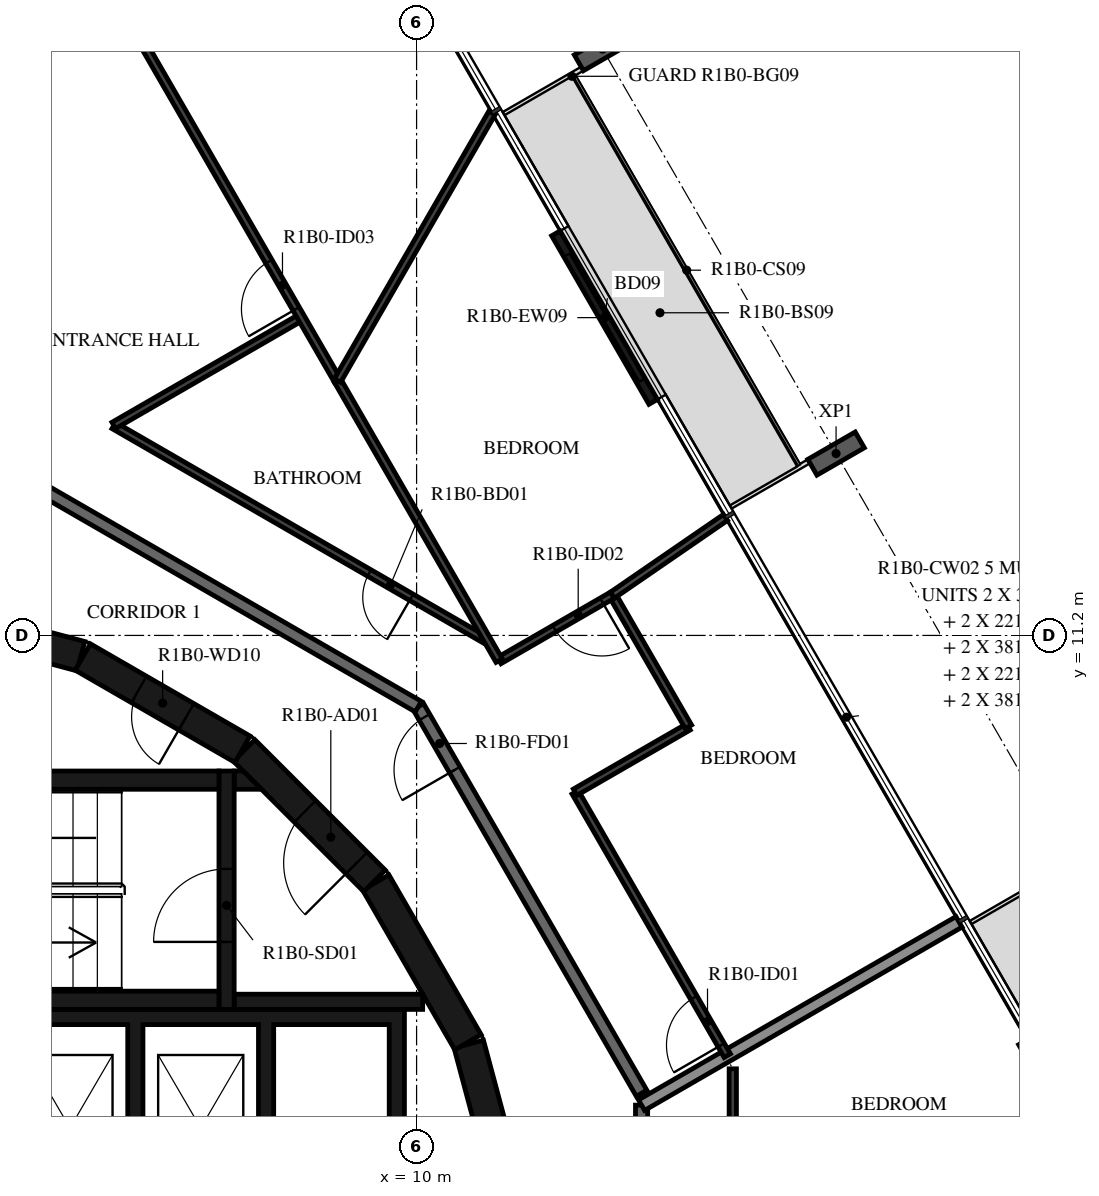
"""IFC4 building model, lengths in metres.
Left out: names, types, materials, properties, quantities, classifications, styles, units other than length and angle.
Written with IfcOpenShell. Run it as: python <this file> out.ifc"""

import sys

from ifc_helpers import new_model, si_unit, direction, frame, frame_2d, origin, origin_2d, place, context, subcontext, project, spatial, polyline, rectangle, i_section, outline, extrude, element, fill, save


model = new_model("IFC4")
c1 = context("Model", 3, precision=1e-05, world=origin(), true_north=direction((0.0, 1.0)))
c2 = subcontext(c1, "Body", "Model", "MODEL_VIEW")
j1 = project(units=[si_unit("LENGTHUNIT", "METRE"), si_unit("PLANEANGLEUNIT", "RADIAN")], contexts=[c1])
p1 = place(None, origin())
s1 = spatial("IfcSite", under=j1, at=p1, CompositionType="ELEMENT")
p2 = place(p1, origin())
s2 = spatial("IfcBuilding", under=s1, at=p2, CompositionType="ELEMENT")
p3 = place(p2, frame((0.0, 0.0, 52.4)))
s3 = spatial("IfcBuildingStorey", under=s2, at=p3, CompositionType="ELEMENT", Elevation=52.4)
for number, where, z_axis, x_axis in (
    (1, (16.899, 14.19, -0.38), (0.0, 0.0, 1.0), (0.5, -0.866, 0.0)),
    (2, (13.059, 20.842, -0.38), (0.0, 0.0, 1.0), (0.5, -0.866, 0.0)),
):
    element("IfcColumn", number, at=place(p3, frame(where, z_axis=z_axis, x_axis=x_axis)), inside=s3, PredefinedType="COLUMN", context=c2, shape_type="SweptSolid", body=[
        extrude(i_section(OverallWidth=0.3, OverallDepth=0.9, WebThickness=0.019, FlangeThickness=0.035, FilletRadius=0.03, at=origin_2d()), origin(), (0.0, 0.0, 1.0), 3.5),
    ])
p4 = place(p3, frame((21.571, 1.738, 0.0), z_axis=(0.0, 0.0, 1.0), x_axis=(-0.500028443584, 0.866008981251, 0.0)))
e3 = element("IfcWall", 3, at=p4, inside=s3, PredefinedType="STANDARD", context=c2, shape_type="SweptSolid", body=[
    extrude(rectangle(XDim=3.2, YDim=0.16, at=frame_2d((1.6, 0.0))), origin(), (0.0, 0.0, 1.0), 3.12),
])
p5 = place(p4, frame((0.4, 0.0, 0.0)))
e4 = element("IfcOpeningElement", 4, at=p5, cuts=e3, PredefinedType="OPENING", context=c2, shape_type="SweptSolid", body=[
    extrude(rectangle(XDim=2.4, YDim=2.4, at=frame_2d((1.2, 1.2))), frame((0.0, 0.09, 0.0), z_axis=(0.0, -1.0, 0.0), x_axis=(1.0, 0.0, 0.0)), (0.0, 0.0, 1.0), 0.18),
])
p6 = place(p3, frame((13.891, 15.041, 0.0), z_axis=(0.0, 0.0, 1.0), x_axis=(-0.499971222258, 0.866042017984, 0.0)))
e5 = element("IfcWall", 5, at=p6, inside=s3, PredefinedType="STANDARD", context=c2, shape_type="SweptSolid", body=[
    extrude(rectangle(XDim=3.2, YDim=0.16, at=frame_2d((1.6, 0.0))), origin(), (0.0, 0.0, 1.0), 3.12),
])
p7 = place(p6, frame((0.4, 0.0, 0.0)))
e6 = element("IfcOpeningElement", 6, at=p7, cuts=e5, PredefinedType="OPENING", context=c2, shape_type="SweptSolid", body=[
    extrude(rectangle(XDim=2.4, YDim=2.4, at=frame_2d((1.2, 1.2))), frame((0.0, 0.09, 0.0), z_axis=(0.0, -1.0, 0.0), x_axis=(1.0, 0.0, 0.0)), (0.0, 0.0, 1.0), 0.18),
])
for number, where, z_axis, x_axis in (
    (7, (11.643, 1.55, 0.0), (0.0, 0.0, 1.0), (-0.259, 0.966, 0.0)),
    (8, (10.845, 4.51, 0.0), (0.0, 0.0, 1.0), (-0.5, 0.866, 0.0)),
):
    element("IfcWall", number, at=place(p3, frame(where, z_axis=z_axis, x_axis=x_axis)), inside=s3, PredefinedType="SHEAR", context=c2, shape_type="SweptSolid", body=[
        extrude(rectangle(XDim=3.033, YDim=0.5, at=frame_2d((1.516, 0.0))), origin(), (0.0, 0.0, 1.0), 3.12),
    ])
p8 = place(p3, frame((9.308, 7.164, 0.0), z_axis=(0.0, 0.0, 1.0), x_axis=(-0.707106781187, 0.707106781187, 0.0)))
e9 = element("IfcWall", 9, at=p8, inside=s3, PredefinedType="SHEAR", context=c2, shape_type="SweptSolid", body=[
    extrude(rectangle(XDim=3.032, YDim=0.5, at=frame_2d((1.516, 0.0))), origin(), (0.0, 0.0, 1.0), 3.12),
])
p9 = place(p8, frame((0.416, 0.0, 0.0)))
e10 = element("IfcOpeningElement", 10, at=p9, cuts=e9, PredefinedType="OPENING", context=c2, shape_type="SweptSolid", body=[
    extrude(rectangle(XDim=1.2, YDim=2.1, at=frame_2d((0.6, 1.05))), frame((0.0, 0.26, 0.0), z_axis=(0.0, -1.0, 0.0), x_axis=(1.0, 0.0, 0.0)), (0.0, 0.0, 1.0), 0.52),
])
p10 = place(p3, frame((7.137, 9.329, 0.0), z_axis=(0.0, 0.0, 1.0), x_axis=(-0.865975092491, 0.500087131594, 0.0)))
e11 = element("IfcWall", 11, at=p10, inside=s3, PredefinedType="SHEAR", context=c2, shape_type="SweptSolid", body=[
    extrude(rectangle(XDim=3.033, YDim=0.5, at=frame_2d((1.516, 0.0))), origin(), (0.0, 0.0, 1.0), 3.12),
])
p11 = place(p10, frame((1.066, 0.0, 0.0)))
e12 = element("IfcOpeningElement", 12, at=p11, cuts=e11, PredefinedType="OPENING", context=c2, shape_type="SweptSolid", body=[
    extrude(rectangle(XDim=0.9, YDim=2.1, at=frame_2d((0.45, 1.05))), frame((0.0, 0.26, 0.0), z_axis=(0.0, -1.0, 0.0), x_axis=(1.0, 0.0, 0.0)), (0.0, 0.0, 1.0), 0.52),
])
p12 = place(p3, frame((4.479, 10.858, 0.0), z_axis=(0.0, 0.0, 1.0), x_axis=(-0.965948410781, 0.258734743916, 0.0)))
e13 = element("IfcWall", 13, at=p12, inside=s3, PredefinedType="SHEAR", context=c2, shape_type="SweptSolid", body=[
    extrude(rectangle(XDim=3.033, YDim=0.5, at=frame_2d((1.516, 0.0))), origin(), (0.0, 0.0, 1.0), 3.12),
])
for number, where, z_axis, x_axis in (
    (14, (0.0, 5.2, 0.0), (0.0, 0.0, 1.0), (1.0, 0.0, 0.0)),
    (15, (0.0, 8.82, 0.0), (0.0, 0.0, 1.0), (1.0, 0.0, 0.0)),
):
    element("IfcWall", number, at=place(p3, frame(where, z_axis=z_axis, x_axis=x_axis)), inside=s3, PredefinedType="SHEAR", context=c2, shape_type="SweptSolid", body=[
        extrude(rectangle(XDim=6.75, YDim=0.3, at=frame_2d((3.375, 0.0))), origin(), (0.0, 0.0, 1.0), 3.12),
    ])
p13 = place(p3, frame((6.875, 5.05, 0.0), z_axis=(0.0, 0.0, 1.0), x_axis=(0.0, 1.0, 0.0)))
e16 = element("IfcWall", 16, at=p13, inside=s3, PredefinedType="SHEAR", context=c2, shape_type="SweptSolid", body=[
    extrude(rectangle(XDim=3.92, YDim=0.25, at=frame_2d((1.96, 0.0))), origin(), (0.0, 0.0, 1.0), 3.12),
])
p14 = place(p13, frame((1.11, 0.0, 0.0)))
e17 = element("IfcOpeningElement", 17, at=p14, cuts=e16, PredefinedType="OPENING", context=c2, shape_type="SweptSolid", body=[
    extrude(rectangle(XDim=1.2, YDim=2.1, at=frame_2d((0.6, 1.05))), frame((0.0, 0.135, 0.0), z_axis=(0.0, -1.0, 0.0), x_axis=(1.0, 0.0, 0.0)), (0.0, 0.0, 1.0), 0.27),
])
p15 = place(p3, frame((7.0, 5.175, 0.0), z_axis=(0.0, 0.0, 1.0), x_axis=(1.0, 0.0, 0.0)))
e18 = element("IfcWall", 18, at=p15, inside=s3, PredefinedType="SHEAR", context=c2, shape_type="SweptSolid", body=[
    extrude(rectangle(XDim=3.1, YDim=0.25, at=frame_2d((1.55, 0.0))), origin(), (0.0, 0.0, 1.0), 3.12),
])
p16 = place(p3, origin())
e19 = element("IfcWall", 19, at=p16, inside=s3, PredefinedType="SHEAR", context=c2, shape_type="SweptSolid", body=[
    extrude(outline(polyline([(7.448, 8.67), (7.0, 8.67), (7.0, 8.97), (7.148, 8.97), (7.448, 8.67)])), origin(), (0.0, 0.0, 1.0), 3.12),
])
p17 = place(p3, origin())
e20 = element("IfcWall", 20, at=p17, inside=s3, PredefinedType="SHEAR", context=c2, shape_type="SweptSolid", body=[
    extrude(outline(polyline([(-9.55, 4.8), (-7.65, 4.8), (-7.65, 1.9), (-7.4, 1.9), (-7.4, 4.8), (-5.5, 4.8), (-5.5, 1.9), (-5.25, 1.9), (-5.25, 4.8), (-3.35, 4.8), (-3.35, 1.9), (-3.1, 1.9), (-3.1, 4.8), (-1.2, 4.8), (-1.2, 1.9), (-0.95, 1.9), (-0.95, 4.8), (0.95, 4.8), (0.95, 1.9), (1.2, 1.9), (1.2, 4.8), (3.1, 4.8), (3.1, 1.9), (3.35, 1.9), (3.35, 4.8), (5.25, 4.8), (5.25, 1.9), (5.5, 1.9), (5.5, 4.8), (7.4, 4.8), (7.4, 1.9), (7.65, 1.9), (7.65, 4.8), (9.55, 4.8), (9.55, 1.9), (9.8, 1.9), (9.8, 4.8), (9.8, 5.05), (-9.8, 5.05), (-9.8, 4.8), (-9.8, 1.9), (-9.55, 1.9), (-9.55, 4.8)])), origin(), (0.0, 0.0, 1.0), 3.12),
])
p18 = place(p3, frame((13.7, 3.671, 0.0), z_axis=(0.0, 0.0, 1.0), x_axis=(-0.500001669485, 0.866024439905, 0.0)))
e21 = element("IfcWall", 21, at=p18, inside=s3, PredefinedType="STANDARD", context=c2, shape_type="SweptSolid", body=[
    extrude(rectangle(XDim=7.342, YDim=0.2, at=frame_2d((3.671, 0.0))), origin(), (0.0, 0.0, 1.0), 3.12),
])
p19 = place(p18, frame((6.142, 0.0, 0.0)))
e22 = element("IfcOpeningElement", 22, at=p19, cuts=e21, PredefinedType="OPENING", context=c2, shape_type="SweptSolid", body=[
    extrude(rectangle(XDim=1.0, YDim=2.1, at=frame_2d((0.5, 1.05))), frame((0.0, 0.11, 0.0), z_axis=(0.0, -1.0, 0.0), x_axis=(1.0, 0.0, 0.0)), (0.0, 0.0, 1.0), 0.22),
])
p20 = place(p3, frame((10.029, 10.029, 0.0), z_axis=(0.0, 0.0, 1.0), x_axis=(-0.866024439905, 0.500001669485, 0.0)))
e23 = element("IfcWall", 23, at=p20, inside=s3, PredefinedType="STANDARD", context=c2, shape_type="SweptSolid", body=[
    extrude(rectangle(XDim=7.342, YDim=0.2, at=frame_2d((3.671, 0.0))), origin(), (0.0, 0.0, 1.0), 3.12),
])
p21 = place(p3, frame((13.7, -3.671, 0.0), z_axis=(0.0, 0.0, 1.0), x_axis=(0.0, 1.0, 0.0)))
e24 = element("IfcWall", 24, at=p21, inside=s3, PredefinedType="STANDARD", context=c2, shape_type="SweptSolid", body=[
    extrude(rectangle(XDim=7.146, YDim=0.2, at=frame_2d((3.573, 0.0))), origin(), (0.0, 0.0, 1.0), 3.12),
])
p22 = place(p21, frame((5.947, 0.0, 0.0)))
e25 = element("IfcOpeningElement", 25, at=p22, cuts=e24, PredefinedType="OPENING", context=c2, shape_type="SweptSolid", body=[
    extrude(rectangle(XDim=1.0, YDim=2.1, at=frame_2d((0.5, 1.05))), frame((0.0, 0.11, 0.0), z_axis=(0.0, -1.0, 0.0), x_axis=(1.0, 0.0, 0.0)), (0.0, 0.0, 1.0), 0.22),
])
p23 = place(p3, frame((13.7, 3.476, 0.0), z_axis=(0.0, 0.0, 1.0), x_axis=(0.866013584312, 0.500020471368, 0.0)))
e26 = element("IfcWall", 26, at=p23, inside=s3, PredefinedType="STANDARD", context=c2, shape_type="SweptSolid", body=[
    extrude(rectangle(XDim=6.028, YDim=0.2, at=frame_2d((3.014, 0.0))), origin(), (0.0, 0.0, 1.0), 2.73),
])
p24 = place(p3, frame((15.11, 4.289, 0.0), z_axis=(0.0, 0.0, 1.0), x_axis=(-0.500033654285, 0.866005972602, 0.0)))
e27 = element("IfcWall", 27, at=p24, inside=s3, PredefinedType="PARTITIONING", context=c2, shape_type="SweptSolid", body=[
    extrude(rectangle(XDim=5.003, YDim=0.12, at=frame_2d((2.501, 0.0))), origin(), (0.0, 0.0, 1.0), 3.12),
])
p25 = place(p24, frame((0.2, 0.0, 0.0)))
e28 = element("IfcOpeningElement", 28, at=p25, cuts=e27, PredefinedType="OPENING", context=c2, shape_type="SweptSolid", body=[
    extrude(rectangle(XDim=0.9, YDim=2.1, at=frame_2d((0.45, 1.05))), frame((0.0, 0.07, 0.0), z_axis=(0.0, -1.0, 0.0), x_axis=(1.0, 0.0, 0.0)), (0.0, 0.0, 1.0), 0.14),
])
p26 = place(p3, frame((12.608, 8.622, 0.0), z_axis=(0.0, 0.0, 1.0), x_axis=(0.866005997533, 0.500033611107, 0.0)))
e29 = element("IfcWall", 29, at=p26, inside=s3, PredefinedType="PARTITIONING", context=c2, shape_type="SweptSolid", body=[
    extrude(rectangle(XDim=2.151, YDim=0.12, at=frame_2d((1.075, 0.0))), origin(), (0.0, 0.0, 1.0), 3.12),
])
p27 = place(p3, frame((14.471, 9.697, 0.0), z_axis=(0.0, 0.0, 1.0), x_axis=(-0.500004234368, 0.866022959057, 0.0)))
e30 = element("IfcWall", 30, at=p27, inside=s3, PredefinedType="PARTITIONING", context=c2, shape_type="SweptSolid", body=[
    extrude(rectangle(XDim=2.5, YDim=0.12, at=frame_2d((1.25, 0.0))), origin(), (0.0, 0.0, 1.0), 3.12),
])
p28 = place(p3, frame((13.221, 11.862, 0.0), z_axis=(0.0, 0.0, 1.0), x_axis=(-0.866055151781, -0.499948471418, 0.0)))
e31 = element("IfcWall", 31, at=p28, inside=s3, PredefinedType="PARTITIONING", context=c2, shape_type="SweptSolid", body=[
    extrude(rectangle(XDim=2.151, YDim=0.12, at=frame_2d((1.075, 0.0))), origin(), (0.0, 0.0, 1.0), 3.12),
])
p29 = place(p28, frame((0.2, 0.0, 0.0)))
e32 = element("IfcOpeningElement", 32, at=p29, cuts=e31, PredefinedType="OPENING", context=c2, shape_type="SweptSolid", body=[
    extrude(rectangle(XDim=0.9, YDim=2.1, at=frame_2d((0.45, 1.05))), frame((0.0, 0.07, 0.0), z_axis=(0.0, -1.0, 0.0), x_axis=(1.0, 0.0, 0.0)), (0.0, 0.0, 1.0), 0.14),
])
p30 = place(p3, frame((11.127, 11.127, 0.0), z_axis=(0.0, 0.0, 1.0), x_axis=(-0.86602299963, 0.500004164094, 0.0)))
e33 = element("IfcWall", 33, at=p30, inside=s3, PredefinedType="PARTITIONING", context=c2, shape_type="SweptSolid", body=[
    extrude(rectangle(XDim=7.052, YDim=0.12, at=frame_2d((3.526, 0.0))), origin(), (0.0, 0.0, 1.0), 3.12),
])
p31 = place(p30, frame((1.4, 0.0, 0.0)))
e34 = element("IfcOpeningElement", 34, at=p31, cuts=e33, PredefinedType="OPENING", context=c2, shape_type="SweptSolid", body=[
    extrude(rectangle(XDim=0.8, YDim=2.1, at=frame_2d((0.4, 1.05))), frame((0.0, 0.07, 0.0), z_axis=(0.0, -1.0, 0.0), x_axis=(1.0, 0.0, 0.0)), (0.0, 0.0, 1.0), 0.14),
])
p32 = place(p3, frame((5.02, 14.653, 0.0), z_axis=(0.0, 0.0, 1.0), x_axis=(0.866028940167, 0.499993874756, 0.0)))
e35 = element("IfcWall", 35, at=p32, inside=s3, PredefinedType="PARTITIONING", context=c2, shape_type="SweptSolid", body=[
    extrude(rectangle(XDim=3.556, YDim=0.12, at=frame_2d((1.778, 0.0))), origin(), (0.0, 0.0, 1.0), 3.12),
])
p33 = place(p3, frame((8.7, 15.392, 0.0), z_axis=(0.0, 0.0, 1.0), x_axis=(-0.500002742713, 0.866023820272, 0.0)))
e36 = element("IfcWall", 36, at=p33, inside=s3, PredefinedType="PARTITIONING", context=c2, shape_type="SweptSolid", body=[
    extrude(rectangle(XDim=10.908, YDim=0.12, at=frame_2d((5.454, 0.0))), origin(), (0.0, 0.0, 1.0), 3.12),
])
p34 = place(p33, frame((1.36, 0.0, 0.0)))
e37 = element("IfcOpeningElement", 37, at=p34, cuts=e36, PredefinedType="OPENING", context=c2, shape_type="SweptSolid", body=[
    extrude(rectangle(XDim=0.9, YDim=2.1, at=frame_2d((0.45, 1.05))), frame((0.0, 0.07, 0.0), z_axis=(0.0, -1.0, 0.0), x_axis=(1.0, 0.0, 0.0)), (0.0, 0.0, 1.0), 0.14),
])
p35 = place(p33, frame((8.317, 0.0, 0.0)))
e38 = element("IfcOpeningElement", 38, at=p35, cuts=e36, PredefinedType="OPENING", context=c2, shape_type="SweptSolid", body=[
    extrude(rectangle(XDim=0.9, YDim=2.1, at=frame_2d((0.45, 1.05))), frame((0.0, 0.07, 0.0), z_axis=(0.0, -1.0, 0.0), x_axis=(1.0, 0.0, 0.0)), (0.0, 0.0, 1.0), 0.14),
])
p36 = place(p3, frame((4.841, 22.075, 0.0), z_axis=(0.0, 0.0, 1.0), x_axis=(-0.866019751484, -0.500009789943, 0.0)))
e39 = element("IfcWall", 39, at=p36, inside=s3, PredefinedType="PARTITIONING", context=c2, shape_type="SweptSolid", body=[
    extrude(rectangle(XDim=5.59, YDim=0.12, at=frame_2d((2.795, 0.0))), origin(), (0.0, 0.0, 1.0), 3.12),
])
p37 = place(p36, frame((0.2, 0.0, 0.0)))
e40 = element("IfcOpeningElement", 40, at=p37, cuts=e39, PredefinedType="OPENING", context=c2, shape_type="SweptSolid", body=[
    extrude(rectangle(XDim=0.9, YDim=2.1, at=frame_2d((0.45, 1.05))), frame((0.0, 0.07, 0.0), z_axis=(0.0, -1.0, 0.0), x_axis=(1.0, 0.0, 0.0)), (0.0, 0.0, 1.0), 0.14),
])
p38 = place(p3, frame((15.08, 13.14, 0.0), z_axis=(0.0, 0.0, 1.0), x_axis=(-0.824041924199, -0.566528822887, 0.0)))
e41 = element("IfcWall", 41, at=p38, inside=s3, PredefinedType="PARTITIONING", context=c2, shape_type="SweptSolid", body=[
    extrude(rectangle(XDim=2.256, YDim=0.12, at=frame_2d((1.128, 0.0))), origin(), (0.0, 0.0, 1.0), 2.73),
])
p39 = place(p3, frame((8.7, 15.392, 0.0), z_axis=(0.0, 0.0, 1.0), x_axis=(0.499986106925, -0.866033424806, 0.0)))
e42 = element("IfcWall", 42, at=p39, inside=s3, PredefinedType="PARTITIONING", context=c2, shape_type="SweptSolid", body=[
    extrude(rectangle(XDim=5.317, YDim=0.12, at=frame_2d((2.659, 0.0))), origin(), (0.0, 0.0, 1.0), 3.12),
])
p40 = place(p3, frame((11.24, 19.792, 0.0), z_axis=(0.0, 0.0, 1.0), x_axis=(-0.499978956711, -0.866037552792, 0.0)))
e43 = element("IfcWall", 43, at=p40, inside=s3, PredefinedType="PARTITIONING", context=c2, shape_type="SweptSolid", body=[
    extrude(rectangle(XDim=5.081, YDim=0.12, at=frame_2d((2.541, 0.0))), origin(), (0.0, 0.0, 1.0), 3.12),
])
p41 = place(p3, frame((15.2, 2.862, 0.0), z_axis=(0.0, 0.0, 1.0), x_axis=(0.0, 1.0, 0.0)))
e44 = element("IfcWall", 44, at=p41, inside=s3, PredefinedType="PARTITIONING", context=c2, shape_type="SweptSolid", body=[
    extrude(rectangle(XDim=1.211, YDim=0.12, at=frame_2d((0.605, 0.0))), origin(), (0.0, 0.0, 1.0), 3.12),
])
p42 = place(p7, origin())
e45 = element("IfcDoor", 45, at=p42, inside=s3, OperationType="DOUBLE_DOOR_SLIDING", PredefinedType="DOOR", context=c2, shape_type="SweptSolid", body=[
    extrude(rectangle(XDim=2.4, YDim=2.4, at=frame_2d((1.2, 1.2))), frame((0.0, 0.025, 0.0), z_axis=(0.0, -1.0, 0.0), x_axis=(1.0, 0.0, 0.0)), (0.0, 0.0, 1.0), 0.05),
])
fill(e6, e45)
p43 = place(p14, origin())
e46 = element("IfcDoor", 46, at=p43, inside=s3, OperationType="SINGLE_SWING_LEFT", PredefinedType="DOOR", context=c2, shape_type="SweptSolid", body=[
    extrude(rectangle(XDim=1.2, YDim=2.1, at=frame_2d((0.6, 1.05))), frame((0.0, 0.025, 0.0), z_axis=(0.0, -1.0, 0.0), x_axis=(1.0, 0.0, 0.0)), (0.0, 0.0, 1.0), 0.05),
])
fill(e17, e46)
p44 = place(p9, origin())
e47 = element("IfcDoor", 47, at=p44, inside=s3, OperationType="SINGLE_SWING_RIGHT", PredefinedType="DOOR", context=c2, shape_type="SweptSolid", body=[
    extrude(rectangle(XDim=1.2, YDim=2.1, at=frame_2d((0.6, 1.05))), frame((0.0, 0.025, 0.0), z_axis=(0.0, -1.0, 0.0), x_axis=(1.0, 0.0, 0.0)), (0.0, 0.0, 1.0), 0.05),
])
fill(e10, e47)
p45 = place(p11, origin())
e48 = element("IfcDoor", 48, at=p45, inside=s3, OperationType="SINGLE_SWING_LEFT", PredefinedType="DOOR", context=c2, shape_type="SweptSolid", body=[
    extrude(rectangle(XDim=0.9, YDim=2.1, at=frame_2d((0.45, 1.05))), frame((0.0, 0.025, 0.0), z_axis=(0.0, -1.0, 0.0), x_axis=(1.0, 0.0, 0.0)), (0.0, 0.0, 1.0), 0.05),
])
fill(e12, e48)
p46 = place(p19, origin())
e49 = element("IfcDoor", 49, at=p46, inside=s3, OperationType="SINGLE_SWING_RIGHT", PredefinedType="DOOR", context=c2, shape_type="SweptSolid", body=[
    extrude(rectangle(XDim=1.0, YDim=2.1, at=frame_2d((0.5, 1.05))), frame((0.0, 0.025, 0.0), z_axis=(0.0, -1.0, 0.0), x_axis=(1.0, 0.0, 0.0)), (0.0, 0.0, 1.0), 0.05),
])
fill(e22, e49)
p47 = place(p25, origin())
e50 = element("IfcDoor", 50, at=p47, inside=s3, OperationType="SINGLE_SWING_LEFT", PredefinedType="DOOR", context=c2, shape_type="SweptSolid", body=[
    extrude(rectangle(XDim=0.9, YDim=2.1, at=frame_2d((0.45, 1.05))), frame((0.0, 0.025, 0.0), z_axis=(0.0, -1.0, 0.0), x_axis=(1.0, 0.0, 0.0)), (0.0, 0.0, 1.0), 0.05),
])
fill(e28, e50)
p48 = place(p29, origin())
e51 = element("IfcDoor", 51, at=p48, inside=s3, OperationType="SINGLE_SWING_RIGHT", PredefinedType="DOOR", context=c2, shape_type="SweptSolid", body=[
    extrude(rectangle(XDim=0.9, YDim=2.1, at=frame_2d((0.45, 1.05))), frame((0.0, 0.025, 0.0), z_axis=(0.0, -1.0, 0.0), x_axis=(1.0, 0.0, 0.0)), (0.0, 0.0, 1.0), 0.05),
])
fill(e32, e51)
p49 = place(p31, origin())
e52 = element("IfcDoor", 52, at=p49, inside=s3, OperationType="SINGLE_SWING_RIGHT", PredefinedType="DOOR", context=c2, shape_type="SweptSolid", body=[
    extrude(rectangle(XDim=0.8, YDim=2.1, at=frame_2d((0.4, 1.05))), frame((0.0, 0.025, 0.0), z_axis=(0.0, -1.0, 0.0), x_axis=(1.0, 0.0, 0.0)), (0.0, 0.0, 1.0), 0.05),
])
fill(e34, e52)
p50 = place(p34, origin())
e53 = element("IfcDoor", 53, at=p50, inside=s3, OperationType="SINGLE_SWING_RIGHT", PredefinedType="DOOR", context=c2, shape_type="SweptSolid", body=[
    extrude(rectangle(XDim=0.9, YDim=2.1, at=frame_2d((0.45, 1.05))), frame((0.0, 0.025, 0.0), z_axis=(0.0, -1.0, 0.0), x_axis=(1.0, 0.0, 0.0)), (0.0, 0.0, 1.0), 0.05),
])
fill(e37, e53)
save(model, sys.argv[1])
